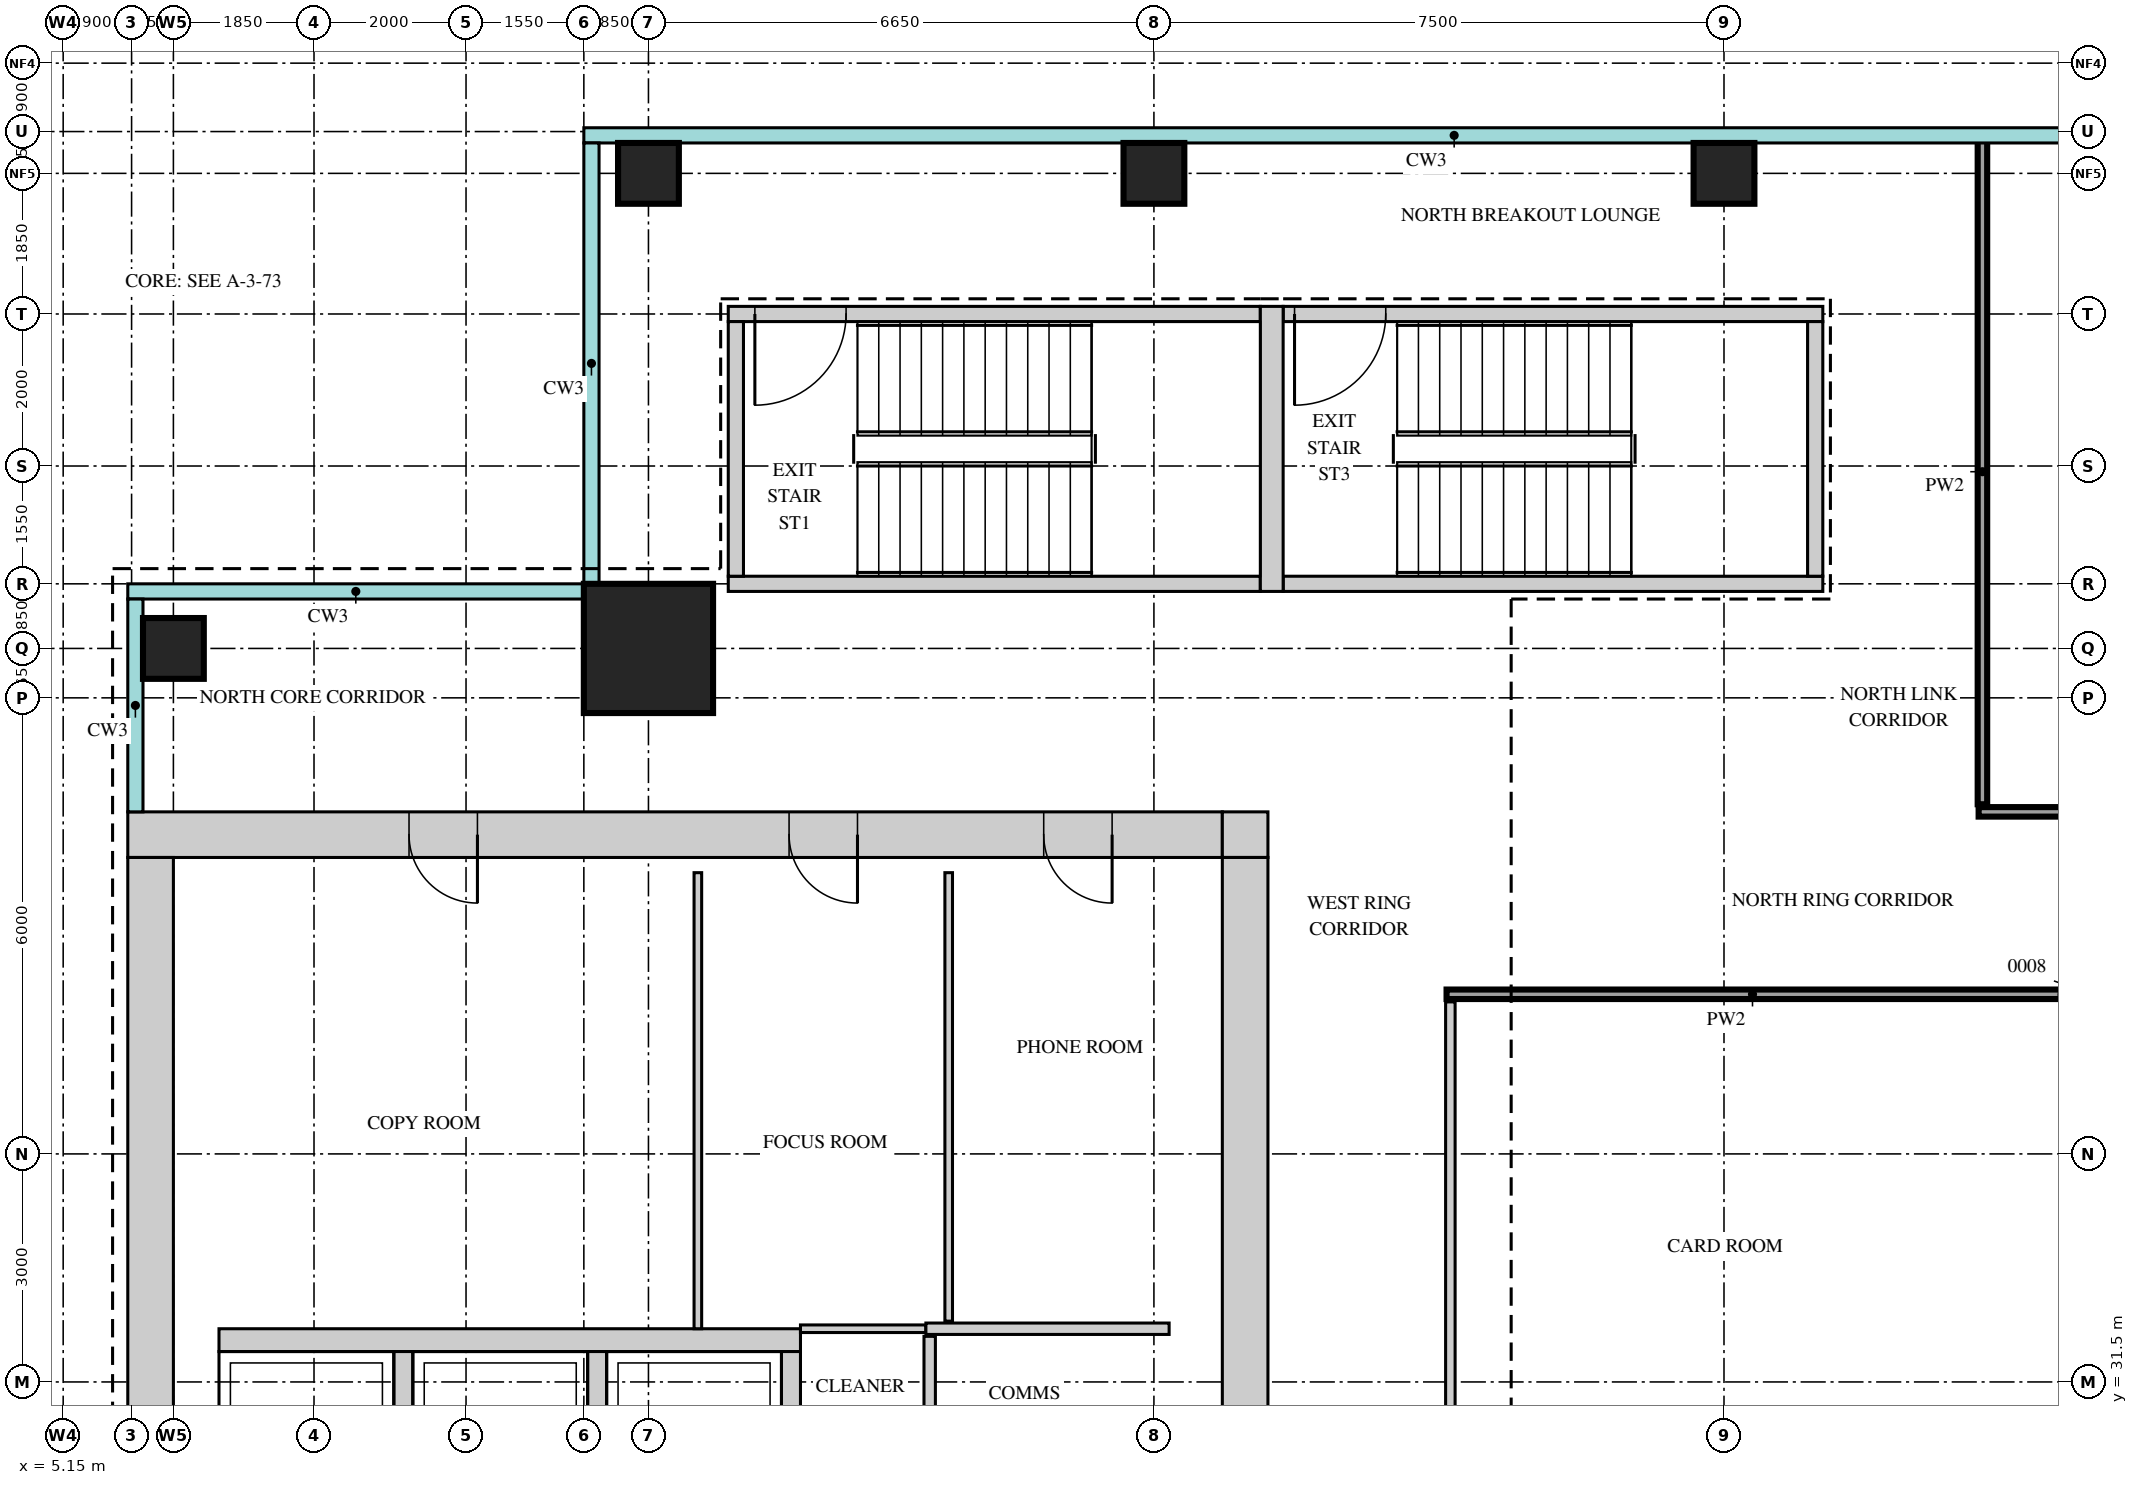
"""IFC4 building model, lengths in metres.
Left out: names, types, materials, properties, quantities, classifications, styles, units other than length and angle.
Written with IfcOpenShell. Run it as: python <this file> out.ifc"""

import sys

from ifc_helpers import new_model, si_unit, direction, frame, frame_2d, origin, origin_2d, place, context, subcontext, project, spatial, rectangle, extrude, source, transform, mapped, element, fill, save


model = new_model("IFC4")
c1 = context("Model", 3, precision=1e-05, world=origin(), true_north=direction((0.0, 1.0)))
c2 = subcontext(c1, "Body", "Model", "MODEL_VIEW")
j1 = project(units=[si_unit("LENGTHUNIT", "METRE"), si_unit("PLANEANGLEUNIT", "RADIAN")], contexts=[c1])
p1 = place(None, origin())
s1 = spatial("IfcSite", under=j1, at=p1, CompositionType="ELEMENT")
p2 = place(p1, origin())
s2 = spatial("IfcBuilding", under=s1, at=p2, CompositionType="ELEMENT")
p3 = place(p2, frame((0.0, 0.0, 302.2)))
s3 = spatial("IfcBuildingStorey", under=s2, at=p3, CompositionType="ELEMENT", Elevation=302.2)
m1 = source(origin(), c2, "Body", "SweptSolid", [
    extrude(rectangle(XDim=14.4, YDim=0.6, at=frame_2d((7.2, 0.0))), origin(), (0.0, 0.0, 1.0), 3.75),
])
p4 = place(p3, frame((6.0, 38.7, 0.0), z_axis=(0.0, 0.0, 1.0), x_axis=(1.0, 0.0, 0.0)))
e1 = element("IfcWall", 1, at=p4, inside=s3, PredefinedType="SHEAR", context=c2, shape_type="MappedRepresentation", body=[
    mapped(m1, transform((0.0, 0.0, 0.0))),
])
m2 = source(origin(), c2, "Body", "SweptSolid", [
    extrude(rectangle(XDim=0.9, YDim=2.1, at=frame_2d((0.45, 1.05))), frame((0.0, 0.31, 0.0), z_axis=(0.0, -1.0, 0.0), x_axis=(1.0, 0.0, 0.0)), (0.0, 0.0, 1.0), 0.62),
])
p5 = place(p4, frame((3.7, 0.0, 0.0)))
e2 = element("IfcOpeningElement", 2, at=p5, cuts=e1, PredefinedType="OPENING", context=c2, shape_type="MappedRepresentation", body=[
    mapped(m2, transform((0.0, 0.0, 0.0))),
])
p6 = place(p4, frame((8.7, 0.0, 0.0)))
e3 = element("IfcOpeningElement", 3, at=p6, cuts=e1, PredefinedType="OPENING", context=c2, shape_type="MappedRepresentation", body=[
    mapped(m2, transform((0.0, 0.0, 0.0))),
])
p7 = place(p4, frame((12.05, 0.0, 0.0)))
e4 = element("IfcOpeningElement", 4, at=p7, cuts=e1, PredefinedType="OPENING", context=c2, shape_type="MappedRepresentation", body=[
    mapped(m2, transform((0.0, 0.0, 0.0))),
])
m3 = source(origin(), c2, "Body", "SweptSolid", [
    extrude(rectangle(XDim=0.6, YDim=0.6, at=frame_2d((0.3, 0.0))), origin(), (0.0, 0.0, 1.0), 3.75),
])
p8 = place(p3, frame((20.4, 38.7, 0.0), z_axis=(0.0, 0.0, 1.0), x_axis=(1.0, 0.0, 0.0)))
e5 = element("IfcWall", 5, at=p8, inside=s3, PredefinedType="SHEAR", context=c2, shape_type="MappedRepresentation", body=[
    mapped(m3, transform((0.0, 0.0, 0.0))),
])
m4 = source(origin(), c2, "Body", "SweptSolid", [
    extrude(rectangle(XDim=22.8, YDim=0.6, at=frame_2d((11.4, 0.0))), origin(), (0.0, 0.0, 1.0), 3.75),
])
p9 = place(p3, frame((20.7, 15.6, 0.0), z_axis=(0.0, 0.0, 1.0), x_axis=(0.0, 1.0, 0.0)))
e6 = element("IfcWall", 6, at=p9, inside=s3, PredefinedType="SHEAR", context=c2, shape_type="MappedRepresentation", body=[
    mapped(m4, transform((0.0, 0.0, 0.0))),
])
m5 = source(origin(), c2, "Body", "SweptSolid", [
    extrude(rectangle(XDim=1.8, YDim=2.1, at=frame_2d((0.9, 1.05))), frame((0.0, 0.31, 0.0), z_axis=(0.0, -1.0, 0.0), x_axis=(1.0, 0.0, 0.0)), (0.0, 0.0, 1.0), 0.62),
])
p10 = place(p9, frame((10.9, 0.0, 0.0)))
e7 = element("IfcOpeningElement", 7, at=p10, cuts=e6, PredefinedType="OPENING", context=c2, shape_type="MappedRepresentation", body=[
    mapped(m5, transform((0.0, 0.0, 0.0))),
])
p11 = place(p9, frame((0.55, 0.0, 0.0)))
e8 = element("IfcOpeningElement", 8, at=p11, cuts=e6, PredefinedType="OPENING", context=c2, shape_type="MappedRepresentation", body=[
    mapped(m2, transform((0.0, 0.0, 0.0))),
])
p12 = place(p9, frame((4.1, 0.0, 0.0)))
e9 = element("IfcOpeningElement", 9, at=p12, cuts=e6, PredefinedType="OPENING", context=c2, shape_type="MappedRepresentation", body=[
    mapped(m2, transform((0.0, 0.0, 0.0))),
])
p13 = place(p3, frame((6.3, 15.6, 0.0), z_axis=(0.0, 0.0, 1.0), x_axis=(0.0, 1.0, 0.0)))
e10 = element("IfcWall", 10, at=p13, inside=s3, PredefinedType="SHEAR", context=c2, shape_type="MappedRepresentation", body=[
    mapped(m4, transform((0.0, 0.0, 0.0))),
])
m6 = source(origin(), c2, "Body", "SweptSolid", [
    extrude(rectangle(XDim=7.0, YDim=0.2, at=frame_2d((3.5, 0.0))), origin(), (0.0, 0.0, 1.0), 3.75),
])
p14 = place(p3, frame((13.9, 45.55, 0.0), z_axis=(0.0, 0.0, 1.0), x_axis=(1.0, 0.0, 0.0)))
e11 = element("IfcWall", 11, at=p14, inside=s3, PredefinedType="SHEAR", context=c2, shape_type="MappedRepresentation", body=[
    mapped(m6, transform((0.0, 0.0, 0.0))),
])
m7 = source(origin(), c2, "Body", "SweptSolid", [
    extrude(rectangle(XDim=1.2, YDim=2.1, at=frame_2d((0.6, 1.05))), frame((0.0, 0.11, 0.0), z_axis=(0.0, -1.0, 0.0), x_axis=(1.0, 0.0, 0.0)), (0.0, 0.0, 1.0), 0.22),
])
p15 = place(p14, frame((0.35, 0.0, 0.0)))
e12 = element("IfcOpeningElement", 12, at=p15, cuts=e11, PredefinedType="OPENING", context=c2, shape_type="MappedRepresentation", body=[
    mapped(m7, transform((0.0, 0.0, 0.0))),
])
p16 = place(p3, frame((13.9, 42.0, 0.0), z_axis=(0.0, 0.0, 1.0), x_axis=(1.0, 0.0, 0.0)))
e13 = element("IfcWall", 13, at=p16, inside=s3, PredefinedType="SHEAR", context=c2, shape_type="MappedRepresentation", body=[
    mapped(m6, transform((0.0, 0.0, 0.0))),
])
m8 = source(origin(), c2, "Body", "SweptSolid", [
    extrude(rectangle(XDim=7.1, YDim=0.2, at=frame_2d((3.55, 0.0))), origin(), (0.0, 0.0, 1.0), 3.75),
])
p17 = place(p3, frame((21.2, 45.55, 0.0), z_axis=(0.0, 0.0, 1.0), x_axis=(1.0, 0.0, 0.0)))
e14 = element("IfcWall", 14, at=p17, inside=s3, PredefinedType="SHEAR", context=c2, shape_type="MappedRepresentation", body=[
    mapped(m8, transform((0.0, 0.0, 0.0))),
])
p18 = place(p17, frame((0.15, 0.0, 0.0)))
e15 = element("IfcOpeningElement", 15, at=p18, cuts=e14, PredefinedType="OPENING", context=c2, shape_type="MappedRepresentation", body=[
    mapped(m7, transform((0.0, 0.0, 0.0))),
])
p19 = place(p3, frame((21.2, 42.0, 0.0), z_axis=(0.0, 0.0, 1.0), x_axis=(1.0, 0.0, 0.0)))
e16 = element("IfcWall", 16, at=p19, inside=s3, PredefinedType="SHEAR", context=c2, shape_type="MappedRepresentation", body=[
    mapped(m8, transform((0.0, 0.0, 0.0))),
])
m9 = source(origin(), c2, "Body", "SweptSolid", [
    extrude(rectangle(XDim=3.75, YDim=0.3, at=frame_2d((1.875, 0.0))), origin(), (0.0, 0.0, 1.0), 3.75),
])
p20 = place(p3, frame((21.05, 41.9, 0.0), z_axis=(0.0, 0.0, 1.0), x_axis=(0.0, 1.0, 0.0)))
e17 = element("IfcWall", 17, at=p20, inside=s3, PredefinedType="SHEAR", context=c2, shape_type="MappedRepresentation", body=[
    mapped(m9, transform((0.0, 0.0, 0.0))),
])
m10 = source(origin(), c2, "Body", "SweptSolid", [
    extrude(rectangle(XDim=3.35, YDim=0.2, at=frame_2d((1.675, 0.0))), origin(), (0.0, 0.0, 1.0), 3.75),
])
for number, where, z_axis, x_axis in (
    (18, (14.0, 42.1, 0.0), (0.0, 0.0, 1.0), (0.0, 1.0, 0.0)),
    (19, (28.2, 42.1, 0.0), (0.0, 0.0, 1.0), (0.0, 1.0, 0.0)),
):
    element("IfcWall", number, at=place(p3, frame(where, z_axis=z_axis, x_axis=x_axis)), inside=s3, PredefinedType="SHEAR", context=c2, shape_type="MappedRepresentation", body=[
        mapped(m10, transform((0.0, 0.0, 0.0))),
    ])
m11 = source(origin(), c2, "Body", "SweptSolid", [
    extrude(rectangle(XDim=7.65, YDim=0.3, at=frame_2d((3.825, 0.0))), origin(), (0.0, 0.0, 1.0), 3.75),
])
p21 = place(p3, frame((7.2, 32.05, 0.0), z_axis=(0.0, 0.0, 1.0), x_axis=(1.0, 0.0, 0.0)))
e20 = element("IfcWall", 20, at=p21, inside=s3, PredefinedType="STANDARD", context=c2, shape_type="MappedRepresentation", body=[
    mapped(m11, transform((0.0, 0.0, 0.0))),
])
m12 = source(origin(), c2, "Body", "SweptSolid", [
    extrude(rectangle(XDim=2.4, YDim=0.25, at=frame_2d((1.2, 0.0))), origin(), (0.0, 0.0, 1.0), 3.75),
])
for number, where, z_axis, x_axis in (
    (21, (9.625, 29.5, 0.0), (0.0, 0.0, 1.0), (0.0, 1.0, 0.0)),
    (22, (12.175, 29.5, 0.0), (0.0, 0.0, 1.0), (0.0, 1.0, 0.0)),
    (23, (14.725, 29.5, 0.0), (0.0, 0.0, 1.0), (0.0, 1.0, 0.0)),
):
    element("IfcWall", number, at=place(p3, frame(where, z_axis=z_axis, x_axis=x_axis)), inside=s3, PredefinedType="STANDARD", context=c2, shape_type="MappedRepresentation", body=[
        mapped(m12, transform((0.0, 0.0, 0.0))),
    ])
m13 = source(origin(), c2, "Body", "SweptSolid", [
    extrude(rectangle(XDim=1.7, YDim=1.7, at=origin_2d()), origin(), (0.0, 0.0, 1.0), 3.75),
])
p22 = place(p3, frame((12.85, 41.15, 0.0), z_axis=(0.0, 0.0, 1.0), x_axis=(1.0, 0.0, 0.0)))
e24 = element("IfcColumn", 24, at=p22, inside=s3, PredefinedType="COLUMN", context=c2, shape_type="MappedRepresentation", body=[
    mapped(m13, transform((0.0, 0.0, 0.0))),
])
m14 = source(origin(), c2, "Body", "SweptSolid", [
    extrude(rectangle(XDim=0.8, YDim=0.8, at=origin_2d()), origin(), (0.0, 0.0, 1.0), 3.75),
])
for number, where, z_axis, x_axis in (
    (25, (12.85, 47.4, 0.0), (0.0, 0.0, 1.0), (1.0, 0.0, 0.0)),
    (26, (19.5, 47.4, 0.0), (0.0, 0.0, 1.0), (1.0, 0.0, 0.0)),
    (27, (27.0, 47.4, 0.0), (0.0, 0.0, 1.0), (1.0, 0.0, 0.0)),
    (28, (6.6, 41.15, 0.0), (0.0, 0.0, 1.0), (1.0, 0.0, 0.0)),
):
    element("IfcColumn", number, at=place(p3, frame(where, z_axis=z_axis, x_axis=x_axis)), inside=s3, PredefinedType="COLUMN", context=c2, shape_type="MappedRepresentation", body=[
        mapped(m14, transform((0.0, 0.0, 0.0))),
    ])
m15 = source(origin(), c2, "Body", "SweptSolid", [
    extrude(rectangle(XDim=19.0, YDim=0.125, at=frame_2d((9.5, 0.0))), origin(), (0.0, 0.0, 1.0), 3.8),
])
p23 = place(p3, frame((23.4, 17.5, 0.0), z_axis=(0.0, 0.0, 1.0), x_axis=(0.0, 1.0, 0.0)))
e29 = element("IfcWall", 29, at=p23, inside=s3, PredefinedType="PARTITIONING", context=c2, shape_type="MappedRepresentation", body=[
    mapped(m15, transform((0.0, 0.0, 0.0))),
])
m16 = source(origin(), c2, "Body", "SweptSolid", [
    extrude(rectangle(XDim=0.9, YDim=2.1, at=frame_2d((0.45, 1.05))), frame((0.0, 0.073, 0.0), z_axis=(0.0, -1.0, 0.0), x_axis=(1.0, 0.0, 0.0)), (0.0, 0.0, 1.0), 0.145),
])
p24 = place(p23, frame((8.4, 0.0, 0.0)))
e30 = element("IfcOpeningElement", 30, at=p24, cuts=e29, PredefinedType="OPENING", context=c2, shape_type="MappedRepresentation", body=[
    mapped(m16, transform((0.0, 0.0, 0.0))),
])
m17 = source(origin(), c2, "Body", "SweptSolid", [
    extrude(rectangle(XDim=2.8, YDim=0.15, at=frame_2d((1.4, 0.0))), origin(), (0.0, 0.0, 1.0), 3.8),
])
p25 = place(p3, frame((16.55, 29.3, 0.0), z_axis=(0.0, 0.0, 1.0), x_axis=(0.0, 1.0, 0.0)))
e31 = element("IfcWall", 31, at=p25, inside=s3, PredefinedType="PARTITIONING", context=c2, shape_type="MappedRepresentation", body=[
    mapped(m17, transform((0.0, 0.0, 0.0))),
])
m18 = source(origin(), c2, "Body", "SweptSolid", [
    extrude(rectangle(XDim=6.0, YDim=0.1, at=frame_2d((3.0, 0.0))), origin(), (0.0, 0.0, 1.0), 3.8),
])
p26 = place(p3, frame((13.5, 32.2, 0.0), z_axis=(0.0, 0.0, 1.0), x_axis=(0.0, 1.0, 0.0)))
e32 = element("IfcWall", 32, at=p26, inside=s3, PredefinedType="PARTITIONING", context=c2, shape_type="MappedRepresentation", body=[
    mapped(m18, transform((0.0, 0.0, 0.0))),
])
m19 = source(origin(), c2, "Body", "SweptSolid", [
    extrude(rectangle(XDim=1.65, YDim=0.1, at=frame_2d((0.825, 0.0))), origin(), (0.0, 0.0, 1.0), 3.8),
])
p27 = place(p3, frame((14.85, 32.2, 0.0), z_axis=(0.0, 0.0, 1.0), x_axis=(1.0, 0.0, 0.0)))
e33 = element("IfcWall", 33, at=p27, inside=s3, PredefinedType="PARTITIONING", context=c2, shape_type="MappedRepresentation", body=[
    mapped(m19, transform((0.0, 0.0, 0.0))),
])
m20 = source(origin(), c2, "Body", "SweptSolid", [
    extrude(rectangle(XDim=3.2, YDim=0.15, at=frame_2d((1.6, 0.0))), origin(), (0.0, 0.0, 1.0), 3.8),
])
p28 = place(p3, frame((16.5, 32.2, 0.0), z_axis=(0.0, 0.0, 1.0), x_axis=(1.0, 0.0, 0.0)))
e34 = element("IfcWall", 34, at=p28, inside=s3, PredefinedType="PARTITIONING", context=c2, shape_type="MappedRepresentation", body=[
    mapped(m20, transform((0.0, 0.0, 0.0))),
])
m21 = source(origin(), c2, "Body", "SweptSolid", [
    extrude(rectangle(XDim=5.9, YDim=0.1, at=frame_2d((2.95, 0.0))), origin(), (0.0, 0.0, 1.0), 3.8),
])
p29 = place(p3, frame((16.8, 32.3, 0.0), z_axis=(0.0, 0.0, 1.0), x_axis=(0.0, 1.0, 0.0)))
e35 = element("IfcWall", 35, at=p29, inside=s3, PredefinedType="PARTITIONING", context=c2, shape_type="MappedRepresentation", body=[
    mapped(m21, transform((0.0, 0.0, 0.0))),
])
m22 = source(origin(), c2, "Body", "SweptSolid", [
    extrude(rectangle(XDim=16.7, YDim=0.125, at=frame_2d((8.35, 0.0))), origin(), (0.0, 0.0, 1.0), 3.8),
])
p30 = place(p3, frame((23.35, 36.6, 0.0), z_axis=(0.0, 0.0, 1.0), x_axis=(1.0, 0.0, 0.0)))
e36 = element("IfcWall", 36, at=p30, inside=s3, PredefinedType="PARTITIONING", context=c2, shape_type="MappedRepresentation", body=[
    mapped(m22, transform((0.0, 0.0, 0.0))),
])
p31 = place(p30, frame((8.05, 0.0, 0.0)))
e37 = element("IfcOpeningElement", 37, at=p31, cuts=e36, PredefinedType="OPENING", context=c2, shape_type="MappedRepresentation", body=[
    mapped(m16, transform((0.0, 0.0, 0.0))),
])
m23 = source(origin(), c2, "Body", "SweptSolid", [
    extrude(rectangle(XDim=12.1, YDim=0.125, at=frame_2d((6.05, 0.0))), origin(), (0.0, 0.0, 1.0), 3.8),
])
p32 = place(p3, frame((30.35, 39.0, 0.0), z_axis=(0.0, 0.0, 1.0), x_axis=(1.0, 0.0, 0.0)))
e38 = element("IfcWall", 38, at=p32, inside=s3, PredefinedType="PARTITIONING", context=c2, shape_type="MappedRepresentation", body=[
    mapped(m23, transform((0.0, 0.0, 0.0))),
])
m24 = source(origin(), c2, "Body", "SweptSolid", [
    extrude(rectangle(XDim=1.2, YDim=2.1, at=frame_2d((0.6, 1.05))), frame((0.0, 0.073, 0.0), z_axis=(0.0, -1.0, 0.0), x_axis=(1.0, 0.0, 0.0)), (0.0, 0.0, 1.0), 0.145),
])
p33 = place(p32, frame((5.25, 0.0, 0.0)))
e39 = element("IfcOpeningElement", 39, at=p33, cuts=e38, PredefinedType="OPENING", context=c2, shape_type="MappedRepresentation", body=[
    mapped(m24, transform((0.0, 0.0, 0.0))),
])
m25 = source(origin(), c2, "Body", "SweptSolid", [
    extrude(rectangle(XDim=8.75, YDim=0.125, at=frame_2d((4.375, 0.0))), origin(), (0.0, 0.0, 1.0), 3.8),
])
p34 = place(p3, frame((30.4, 39.1, 0.0), z_axis=(0.0, 0.0, 1.0), x_axis=(0.0, 1.0, 0.0)))
e40 = element("IfcWall", 40, at=p34, inside=s3, PredefinedType="PARTITIONING", context=c2, shape_type="MappedRepresentation", body=[
    mapped(m25, transform((0.0, 0.0, 0.0))),
])
m26 = source(origin(), c2, "Body", "SweptSolid", [
    extrude(rectangle(XDim=0.9, YDim=2.1, at=frame_2d((0.45, 1.05))), frame((0.0, 0.25, 0.0), z_axis=(0.0, -1.0, 0.0), x_axis=(1.0, 0.0, 0.0)), (0.0, 0.0, 1.0), 0.5),
])
p35 = place(p5, origin())
e41 = element("IfcDoor", 41, at=p35, inside=s3, OperationType="SINGLE_SWING_RIGHT", PredefinedType="DOOR", context=c2, shape_type="MappedRepresentation", body=[
    mapped(m26, transform((0.0, 0.0, 0.0))),
])
fill(e2, e41)
p36 = place(p6, origin())
e42 = element("IfcDoor", 42, at=p36, inside=s3, OperationType="SINGLE_SWING_RIGHT", PredefinedType="DOOR", context=c2, shape_type="MappedRepresentation", body=[
    mapped(m26, transform((0.0, 0.0, 0.0))),
])
fill(e3, e42)
p37 = place(p7, origin())
e43 = element("IfcDoor", 43, at=p37, inside=s3, OperationType="SINGLE_SWING_RIGHT", PredefinedType="DOOR", context=c2, shape_type="MappedRepresentation", body=[
    mapped(m26, transform((0.0, 0.0, 0.0))),
])
fill(e4, e43)
m27 = source(origin(), c2, "Body", "SweptSolid", [
    extrude(rectangle(XDim=1.2, YDim=2.1, at=frame_2d((0.6, 1.05))), frame((0.0, 0.025, 0.0), z_axis=(0.0, -1.0, 0.0), x_axis=(1.0, 0.0, 0.0)), (0.0, 0.0, 1.0), 0.05),
])
p38 = place(p15, origin())
e44 = element("IfcDoor", 44, at=p38, inside=s3, OperationType="SINGLE_SWING_LEFT", PredefinedType="DOOR", context=c2, shape_type="MappedRepresentation", body=[
    mapped(m27, transform((0.0, 0.0, 0.0))),
])
fill(e12, e44)
p39 = place(p18, origin())
e45 = element("IfcDoor", 45, at=p39, inside=s3, OperationType="SINGLE_SWING_LEFT", PredefinedType="DOOR", context=c2, shape_type="MappedRepresentation", body=[
    mapped(m27, transform((0.0, 0.0, 0.0))),
])
fill(e15, e45)
save(model, sys.argv[1])
